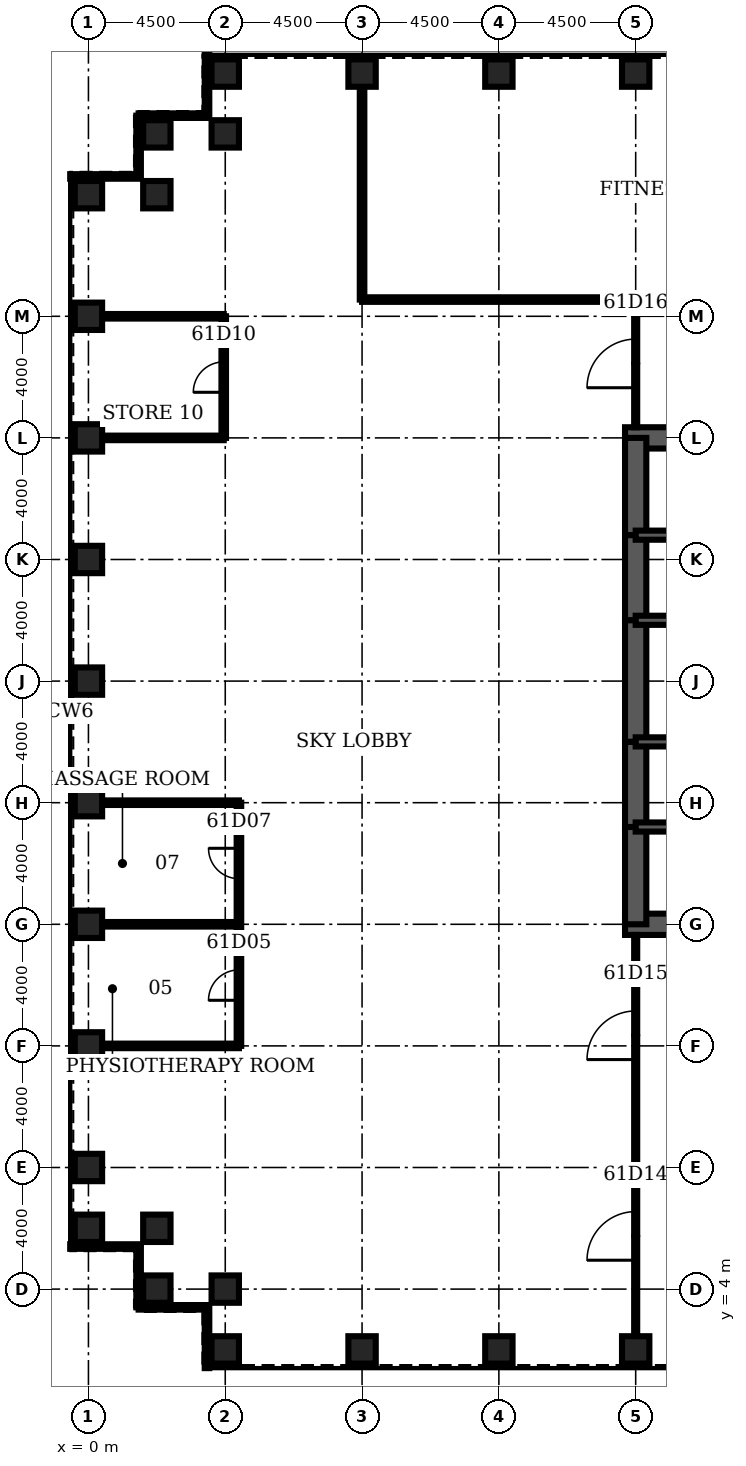
"""IFC4 building model, lengths in metres.
Left out: names, types, materials, properties, quantities, classifications, styles, units other than length and angle.
Written with IfcOpenShell. Run it as: python <this file> out.ifc"""

import sys

from ifc_helpers import new_model, si_unit, direction, frame, frame_2d, origin, origin_2d, place, context, subcontext, project, spatial, rectangle, hollow_rectangle, extrude, element, fill, save


model = new_model("IFC4")
c1 = context("Model", 3, precision=1e-05, world=origin(), true_north=direction((0.0, 1.0)))
c2 = subcontext(c1, "Body", "Model", "MODEL_VIEW")
j1 = project(units=[si_unit("LENGTHUNIT", "METRE"), si_unit("PLANEANGLEUNIT", "RADIAN")], contexts=[c1])
p1 = place(None, origin())
s1 = spatial("IfcSite", under=j1, at=p1, CompositionType="ELEMENT")
p2 = place(p1, origin())
s2 = spatial("IfcBuilding", under=s1, at=p2, CompositionType="ELEMENT")
p3 = place(p2, frame((0.0, 0.0, 271.1)))
s3 = spatial("IfcBuildingStorey", under=s2, at=p3, CompositionType="ELEMENT", Elevation=271.1)
for number, where, z_axis, x_axis in (
    (1, (4.5, 2.0, 0.0), (0.0, 0.0, 1.0), (0.0, 1.0, 0.0)),
    (2, (9.0, 2.0, 0.0), (0.0, 0.0, 1.0), (0.0, 1.0, 0.0)),
    (3, (13.5, 2.0, 0.0), (0.0, 0.0, 1.0), (0.0, 1.0, 0.0)),
    (4, (18.0, 2.0, 0.0), (0.0, 0.0, 1.0), (0.0, 1.0, 0.0)),
    (5, (18.0, 44.0, 0.0), (0.0, 0.0, 1.0), (0.0, 1.0, 0.0)),
    (6, (13.5, 44.0, 0.0), (0.0, 0.0, 1.0), (0.0, 1.0, 0.0)),
    (7, (9.0, 44.0, 0.0), (0.0, 0.0, 1.0), (0.0, 1.0, 0.0)),
    (8, (4.5, 44.0, 0.0), (0.0, 0.0, 1.0), (0.0, 1.0, 0.0)),
    (9, (4.5, 42.0, 0.0), (0.0, 0.0, 1.0), (0.0, 1.0, 0.0)),
    (10, (2.25, 42.0, 0.0), (0.0, 0.0, 1.0), (1.0, 0.0, 0.0)),
    (11, (2.25, 40.0, 0.0), (0.0, 0.0, 1.0), (1.0, 0.0, 0.0)),
    (12, (0.0, 40.0, 0.0), (0.0, 0.0, 1.0), (1.0, 0.0, 0.0)),
    (13, (0.0, 36.0, 0.0), (0.0, 0.0, 1.0), (1.0, 0.0, 0.0)),
    (14, (0.0, 32.0, 0.0), (0.0, 0.0, 1.0), (1.0, 0.0, 0.0)),
    (15, (0.0, 28.0, 0.0), (0.0, 0.0, 1.0), (1.0, 0.0, 0.0)),
    (16, (0.0, 24.0, 0.0), (0.0, 0.0, 1.0), (1.0, 0.0, 0.0)),
    (17, (0.0, 20.0, 0.0), (0.0, 0.0, 1.0), (1.0, 0.0, 0.0)),
    (18, (0.0, 16.0, 0.0), (0.0, 0.0, 1.0), (1.0, 0.0, 0.0)),
    (19, (0.0, 12.0, 0.0), (0.0, 0.0, 1.0), (1.0, 0.0, 0.0)),
    (20, (0.0, 8.0, 0.0), (0.0, 0.0, 1.0), (1.0, 0.0, 0.0)),
    (21, (0.0, 6.0, 0.0), (0.0, 0.0, 1.0), (1.0, 0.0, 0.0)),
    (22, (2.25, 6.0, 0.0), (0.0, 0.0, 1.0), (1.0, 0.0, 0.0)),
    (23, (2.25, 4.0, 0.0), (0.0, 0.0, 1.0), (1.0, 0.0, 0.0)),
    (24, (4.5, 4.0, 0.0), (0.0, 0.0, 1.0), (0.0, 1.0, 0.0)),
):
    element("IfcColumn", number, at=place(p3, frame(where, z_axis=z_axis, x_axis=x_axis)), inside=s3, PredefinedType="COLUMN", context=c2, shape_type="SweptSolid", body=[
        extrude(hollow_rectangle(XDim=0.9, YDim=0.9, WallThickness=0.07, at=origin_2d()), origin(), (0.0, 0.0, 1.0), 4.2),
    ])
for number, where, z_axis, x_axis in (
    (25, (17.65, 16.0, 0.0), (0.0, 0.0, 1.0), (1.0, 0.0, 0.0)),
    (26, (27.0, 32.0, 0.0), (0.0, 0.0, 1.0), (-1.0, 0.0, 0.0)),
):
    element("IfcWall", number, at=place(p3, frame(where, z_axis=z_axis, x_axis=x_axis)), inside=s3, PredefinedType="SHEAR", context=c2, shape_type="SweptSolid", body=[
        extrude(rectangle(XDim=9.35, YDim=0.7, at=frame_2d((4.675, 0.0))), origin(), (0.0, 0.0, 1.0), 4.2),
    ])
p4 = place(p3, frame((18.0, 32.0, 0.0), z_axis=(0.0, 0.0, 1.0), x_axis=(0.0, -1.0, 0.0)))
e27 = element("IfcWall", 27, at=p4, inside=s3, PredefinedType="SHEAR", context=c2, shape_type="SweptSolid", body=[
    extrude(rectangle(XDim=3.2, YDim=0.7, at=frame_2d((1.6, 0.0))), origin(), (0.0, 0.0, 1.0), 4.2),
])
p5 = place(p3, frame((18.0, 28.8, 0.0), z_axis=(0.0, 0.0, 1.0), x_axis=(0.0, -1.0, 0.0)))
e28 = element("IfcWall", 28, at=p5, inside=s3, PredefinedType="SHEAR", context=c2, shape_type="SweptSolid", body=[
    extrude(rectangle(XDim=2.8, YDim=0.7, at=frame_2d((1.4, 0.0))), origin(), (0.0, 0.0, 1.0), 4.2),
])
p6 = place(p5, frame((0.4, 0.0, 0.0)))
e29 = element("IfcOpeningElement", 29, at=p6, cuts=e28, PredefinedType="OPENING", context=c2, shape_type="SweptSolid", body=[
    extrude(rectangle(XDim=1.8, YDim=2.1, at=frame_2d((0.9, 1.05))), frame((0.0, 0.36, 0.0), z_axis=(0.0, -1.0, 0.0), x_axis=(1.0, 0.0, 0.0)), (0.0, 0.0, 1.0), 0.72),
])
p7 = place(p3, frame((18.0, 26.0, 0.0), z_axis=(0.0, 0.0, 1.0), x_axis=(0.0, -1.0, 0.0)))
e30 = element("IfcWall", 30, at=p7, inside=s3, PredefinedType="SHEAR", context=c2, shape_type="SweptSolid", body=[
    extrude(rectangle(XDim=4.0, YDim=0.7, at=frame_2d((2.0, 0.0))), origin(), (0.0, 0.0, 1.0), 4.2),
])
p8 = place(p3, frame((18.0, 22.0, 0.0), z_axis=(0.0, 0.0, 1.0), x_axis=(0.0, -1.0, 0.0)))
e31 = element("IfcWall", 31, at=p8, inside=s3, PredefinedType="SHEAR", context=c2, shape_type="SweptSolid", body=[
    extrude(rectangle(XDim=2.8, YDim=0.7, at=frame_2d((1.4, 0.0))), origin(), (0.0, 0.0, 1.0), 4.2),
])
p9 = place(p8, frame((0.6, 0.0, 0.0)))
e32 = element("IfcOpeningElement", 32, at=p9, cuts=e31, PredefinedType="OPENING", context=c2, shape_type="SweptSolid", body=[
    extrude(rectangle(XDim=1.8, YDim=2.1, at=frame_2d((0.9, 1.05))), frame((0.0, 0.36, 0.0), z_axis=(0.0, -1.0, 0.0), x_axis=(1.0, 0.0, 0.0)), (0.0, 0.0, 1.0), 0.72),
])
p10 = place(p3, frame((18.0, 19.2, 0.0), z_axis=(0.0, 0.0, 1.0), x_axis=(0.0, -1.0, 0.0)))
e33 = element("IfcWall", 33, at=p10, inside=s3, PredefinedType="SHEAR", context=c2, shape_type="SweptSolid", body=[
    extrude(rectangle(XDim=3.2, YDim=0.7, at=frame_2d((1.6, 0.0))), origin(), (0.0, 0.0, 1.0), 4.2),
])
p11 = place(p3, frame((18.0, 19.2, 0.0), z_axis=(0.0, 0.0, 1.0), x_axis=(1.0, 0.0, 0.0)))
e34 = element("IfcWall", 34, at=p11, inside=s3, PredefinedType="SOLIDWALL", context=c2, shape_type="SweptSolid", body=[
    extrude(rectangle(XDim=9.0, YDim=0.3, at=frame_2d((4.5, 0.0))), origin(), (0.0, 0.0, 1.0), 4.2),
])
p12 = place(p11, frame((0.65, 0.0, 0.0)))
e35 = element("IfcOpeningElement", 35, at=p12, cuts=e34, PredefinedType="OPENING", context=c2, shape_type="SweptSolid", body=[
    extrude(rectangle(XDim=1.0, YDim=2.1, at=frame_2d((0.5, 1.05))), frame((0.0, 0.16, 0.0), z_axis=(0.0, -1.0, 0.0), x_axis=(1.0, 0.0, 0.0)), (0.0, 0.0, 1.0), 0.32),
])
p13 = place(p3, frame((18.0, 28.8, 0.0), z_axis=(0.0, 0.0, 1.0), x_axis=(1.0, 0.0, 0.0)))
e36 = element("IfcWall", 36, at=p13, inside=s3, PredefinedType="SOLIDWALL", context=c2, shape_type="SweptSolid", body=[
    extrude(rectangle(XDim=9.0, YDim=0.3, at=frame_2d((4.5, 0.0))), origin(), (0.0, 0.0, 1.0), 4.2),
])
p14 = place(p13, frame((0.65, 0.0, 0.0)))
e37 = element("IfcOpeningElement", 37, at=p14, cuts=e36, PredefinedType="OPENING", context=c2, shape_type="SweptSolid", body=[
    extrude(rectangle(XDim=1.0, YDim=2.1, at=frame_2d((0.5, 1.05))), frame((0.0, 0.16, 0.0), z_axis=(0.0, -1.0, 0.0), x_axis=(1.0, 0.0, 0.0)), (0.0, 0.0, 1.0), 0.32),
])
p15 = place(p3, frame((18.0, 22.0, 0.0), z_axis=(0.0, 0.0, 1.0), x_axis=(1.0, 0.0, 0.0)))
e38 = element("IfcWall", 38, at=p15, inside=s3, PredefinedType="SOLIDWALL", context=c2, shape_type="SweptSolid", body=[
    extrude(rectangle(XDim=6.0, YDim=0.3, at=frame_2d((3.0, 0.0))), origin(), (0.0, 0.0, 1.0), 4.2),
])
p16 = place(p15, frame((2.0, 0.0, 0.0)))
e39 = element("IfcOpeningElement", 39, at=p16, cuts=e38, PredefinedType="OPENING", context=c2, shape_type="SweptSolid", body=[
    extrude(rectangle(XDim=1.0, YDim=2.1, at=frame_2d((0.5, 1.05))), frame((0.0, 0.16, 0.0), z_axis=(0.0, -1.0, 0.0), x_axis=(1.0, 0.0, 0.0)), (0.0, 0.0, 1.0), 0.32),
])
p17 = place(p3, frame((18.0, 26.0, 0.0), z_axis=(0.0, 0.0, 1.0), x_axis=(1.0, 0.0, 0.0)))
e40 = element("IfcWall", 40, at=p17, inside=s3, PredefinedType="SOLIDWALL", context=c2, shape_type="SweptSolid", body=[
    extrude(rectangle(XDim=6.0, YDim=0.3, at=frame_2d((3.0, 0.0))), origin(), (0.0, 0.0, 1.0), 4.2),
])
for number, where, z_axis, x_axis in (
    (41, (0.45, 12.0, 0.0), (0.0, 0.0, 1.0), (1.0, 0.0, 0.0)),
    (42, (0.45, 16.0, 0.0), (0.0, 0.0, 1.0), (1.0, 0.0, 0.0)),
    (43, (0.45, 20.0, 0.0), (0.0, 0.0, 1.0), (1.0, 0.0, 0.0)),
):
    element("IfcWall", number, at=place(p3, frame(where, z_axis=z_axis, x_axis=x_axis)), inside=s3, PredefinedType="PARTITIONING", context=c2, shape_type="SweptSolid", body=[
        extrude(rectangle(XDim=4.5, YDim=0.15, at=frame_2d((2.25, 0.0))), origin(), (0.0, 0.0, 1.0), 3.0),
    ])
for number, where, z_axis, x_axis in (
    (44, (0.45, 32.0, 0.0), (0.0, 0.0, 1.0), (1.0, 0.0, 0.0)),
    (45, (0.45, 36.0, 0.0), (0.0, 0.0, 1.0), (1.0, 0.0, 0.0)),
):
    element("IfcWall", number, at=place(p3, frame(where, z_axis=z_axis, x_axis=x_axis)), inside=s3, PredefinedType="PARTITIONING", context=c2, shape_type="SweptSolid", body=[
        extrude(rectangle(XDim=4.0, YDim=0.15, at=frame_2d((2.0, 0.0))), origin(), (0.0, 0.0, 1.0), 3.0),
    ])
p18 = place(p3, frame((9.0, 36.55, 0.0), z_axis=(0.0, 0.0, 1.0), x_axis=(1.0, 0.0, 0.0)))
e46 = element("IfcWall", 46, at=p18, inside=s3, PredefinedType="PARTITIONING", context=c2, shape_type="SweptSolid", body=[
    extrude(rectangle(XDim=22.5, YDim=0.15, at=frame_2d((11.25, 0.0))), origin(), (0.0, 0.0, 1.0), 3.0),
])
p19 = place(p18, frame((10.45, 0.0, 0.0)))
e47 = element("IfcOpeningElement", 47, at=p19, cuts=e46, PredefinedType="OPENING", context=c2, shape_type="SweptSolid", body=[
    extrude(rectangle(XDim=1.6, YDim=2.1, at=frame_2d((0.8, 1.05))), frame((0.0, 0.085, 0.0), z_axis=(0.0, -1.0, 0.0), x_axis=(1.0, 0.0, 0.0)), (0.0, 0.0, 1.0), 0.17),
])
p20 = place(p3, frame((4.45, 32.0, 0.0), z_axis=(0.0, 0.0, 1.0), x_axis=(0.0, 1.0, 0.0)))
e48 = element("IfcWall", 48, at=p20, inside=s3, PredefinedType="PARTITIONING", context=c2, shape_type="SweptSolid", body=[
    extrude(rectangle(XDim=4.0, YDim=0.15, at=frame_2d((2.0, 0.0))), origin(), (0.0, 0.0, 1.0), 3.0),
])
p21 = place(p20, frame((1.5, 0.0, 0.0)))
e49 = element("IfcOpeningElement", 49, at=p21, cuts=e48, PredefinedType="OPENING", context=c2, shape_type="SweptSolid", body=[
    extrude(rectangle(XDim=1.0, YDim=2.1, at=frame_2d((0.5, 1.05))), frame((0.0, 0.085, 0.0), z_axis=(0.0, -1.0, 0.0), x_axis=(1.0, 0.0, 0.0)), (0.0, 0.0, 1.0), 0.17),
])
p22 = place(p3, frame((4.95, 12.0, 0.0), z_axis=(0.0, 0.0, 1.0), x_axis=(0.0, 1.0, 0.0)))
e50 = element("IfcWall", 50, at=p22, inside=s3, PredefinedType="PARTITIONING", context=c2, shape_type="SweptSolid", body=[
    extrude(rectangle(XDim=8.0, YDim=0.15, at=frame_2d((4.0, 0.0))), origin(), (0.0, 0.0, 1.0), 3.0),
])
p23 = place(p22, frame((1.5, 0.0, 0.0)))
e51 = element("IfcOpeningElement", 51, at=p23, cuts=e50, PredefinedType="OPENING", context=c2, shape_type="SweptSolid", body=[
    extrude(rectangle(XDim=1.0, YDim=2.1, at=frame_2d((0.5, 1.05))), frame((0.0, 0.085, 0.0), z_axis=(0.0, -1.0, 0.0), x_axis=(1.0, 0.0, 0.0)), (0.0, 0.0, 1.0), 0.17),
])
p24 = place(p22, frame((5.5, 0.0, 0.0)))
e52 = element("IfcOpeningElement", 52, at=p24, cuts=e50, PredefinedType="OPENING", context=c2, shape_type="SweptSolid", body=[
    extrude(rectangle(XDim=1.0, YDim=2.1, at=frame_2d((0.5, 1.05))), frame((0.0, 0.085, 0.0), z_axis=(0.0, -1.0, 0.0), x_axis=(1.0, 0.0, 0.0)), (0.0, 0.0, 1.0), 0.17),
])
p25 = place(p3, frame((9.0, 36.55, 0.0), z_axis=(0.0, 0.0, 1.0), x_axis=(0.0, 1.0, 0.0)))
e53 = element("IfcWall", 53, at=p25, inside=s3, PredefinedType="PARTITIONING", context=c2, shape_type="SweptSolid", body=[
    extrude(rectangle(XDim=7.0, YDim=0.15, at=frame_2d((3.5, 0.0))), origin(), (0.0, 0.0, 1.0), 3.0),
])
p26 = place(p3, frame((18.0, 2.45, 0.0), z_axis=(0.0, 0.0, 1.0), x_axis=(0.0, 1.0, 0.0)))
e54 = element("IfcWall", 54, at=p26, inside=s3, PredefinedType="PARTITIONING", context=c2, shape_type="SweptSolid", body=[
    extrude(rectangle(XDim=13.2, YDim=0.1, at=frame_2d((6.6, 0.0))), origin(), (0.0, 0.0, 1.0), 3.0),
])
p27 = place(p26, frame((2.5, 0.0, 0.0)))
e55 = element("IfcOpeningElement", 55, at=p27, cuts=e54, PredefinedType="OPENING", context=c2, shape_type="SweptSolid", body=[
    extrude(rectangle(XDim=1.6, YDim=2.1, at=frame_2d((0.8, 1.05))), frame((0.0, 0.06, 0.0), z_axis=(0.0, -1.0, 0.0), x_axis=(1.0, 0.0, 0.0)), (0.0, 0.0, 1.0), 0.12),
])
p28 = place(p26, frame((9.1, 0.0, 0.0)))
e56 = element("IfcOpeningElement", 56, at=p28, cuts=e54, PredefinedType="OPENING", context=c2, shape_type="SweptSolid", body=[
    extrude(rectangle(XDim=1.6, YDim=2.1, at=frame_2d((0.8, 1.05))), frame((0.0, 0.06, 0.0), z_axis=(0.0, -1.0, 0.0), x_axis=(1.0, 0.0, 0.0)), (0.0, 0.0, 1.0), 0.12),
])
p29 = place(p3, frame((18.0, 32.35, 0.0), z_axis=(0.0, 0.0, 1.0), x_axis=(0.0, 1.0, 0.0)))
e57 = element("IfcWall", 57, at=p29, inside=s3, PredefinedType="PARTITIONING", context=c2, shape_type="SweptSolid", body=[
    extrude(rectangle(XDim=4.2, YDim=0.1, at=frame_2d((2.1, 0.0))), origin(), (0.0, 0.0, 1.0), 3.0),
])
p30 = place(p29, frame((1.3, 0.0, 0.0)))
e58 = element("IfcOpeningElement", 58, at=p30, cuts=e57, PredefinedType="OPENING", context=c2, shape_type="SweptSolid", body=[
    extrude(rectangle(XDim=1.6, YDim=2.1, at=frame_2d((0.8, 1.05))), frame((0.0, 0.06, 0.0), z_axis=(0.0, -1.0, 0.0), x_axis=(1.0, 0.0, 0.0)), (0.0, 0.0, 1.0), 0.12),
])
p31 = place(p3, frame((3.9, 44.6, 0.0), z_axis=(0.0, 0.0, 1.0), x_axis=(0.0, -1.0, 0.0)))
e59 = element("IfcWall", 59, at=p31, inside=s3, PredefinedType="ELEMENTEDWALL", context=c2, shape_type="SweptSolid", body=[
    extrude(rectangle(XDim=2.0, YDim=0.15, at=frame_2d((1.0, 0.0))), origin(), (0.0, 0.0, 1.0), 4.04),
])
p32 = place(p3, frame((3.9, 42.6, 0.0), z_axis=(0.0, 0.0, 1.0), x_axis=(-1.0, 0.0, 0.0)))
e60 = element("IfcWall", 60, at=p32, inside=s3, PredefinedType="ELEMENTEDWALL", context=c2, shape_type="SweptSolid", body=[
    extrude(rectangle(XDim=2.25, YDim=0.15, at=frame_2d((1.125, 0.0))), origin(), (0.0, 0.0, 1.0), 4.04),
])
p33 = place(p3, frame((1.65, 42.6, 0.0), z_axis=(0.0, 0.0, 1.0), x_axis=(0.0, -1.0, 0.0)))
e61 = element("IfcWall", 61, at=p33, inside=s3, PredefinedType="ELEMENTEDWALL", context=c2, shape_type="SweptSolid", body=[
    extrude(rectangle(XDim=2.0, YDim=0.15, at=frame_2d((1.0, 0.0))), origin(), (0.0, 0.0, 1.0), 4.04),
])
for number, where, z_axis, x_axis in (
    (62, (1.65, 40.6, 0.0), (0.0, 0.0, 1.0), (-1.0, 0.0, 0.0)),
    (63, (-0.6, 5.4, 0.0), (0.0, 0.0, 1.0), (1.0, 0.0, 0.0)),
):
    element("IfcWall", number, at=place(p3, frame(where, z_axis=z_axis, x_axis=x_axis)), inside=s3, PredefinedType="ELEMENTEDWALL", context=c2, shape_type="SweptSolid", body=[
        extrude(rectangle(XDim=2.25, YDim=0.15, at=frame_2d((1.125, 0.0))), origin(), (0.0, 0.0, 1.0), 4.04),
    ])
p34 = place(p3, frame((1.65, 5.4, 0.0), z_axis=(0.0, 0.0, 1.0), x_axis=(0.0, -1.0, 0.0)))
e64 = element("IfcWall", 64, at=p34, inside=s3, PredefinedType="ELEMENTEDWALL", context=c2, shape_type="SweptSolid", body=[
    extrude(rectangle(XDim=2.0, YDim=0.15, at=frame_2d((1.0, 0.0))), origin(), (0.0, 0.0, 1.0), 4.04),
])
p35 = place(p3, frame((1.65, 3.4, 0.0), z_axis=(0.0, 0.0, 1.0), x_axis=(1.0, 0.0, 0.0)))
e65 = element("IfcWall", 65, at=p35, inside=s3, PredefinedType="ELEMENTEDWALL", context=c2, shape_type="SweptSolid", body=[
    extrude(rectangle(XDim=2.25, YDim=0.15, at=frame_2d((1.125, 0.0))), origin(), (0.0, 0.0, 1.0), 4.04),
])
p36 = place(p3, frame((3.9, 3.4, 0.0), z_axis=(0.0, 0.0, 1.0), x_axis=(0.0, -1.0, 0.0)))
e66 = element("IfcWall", 66, at=p36, inside=s3, PredefinedType="ELEMENTEDWALL", context=c2, shape_type="SweptSolid", body=[
    extrude(rectangle(XDim=2.0, YDim=0.15, at=frame_2d((1.0, 0.0))), origin(), (0.0, 0.0, 1.0), 4.04),
])
p37 = place(p23, origin())
e67 = element("IfcDoor", 67, at=p37, inside=s3, OperationType="SINGLE_SWING_LEFT", PredefinedType="DOOR", context=c2, shape_type="SweptSolid", body=[
    extrude(rectangle(XDim=1.0, YDim=2.1, at=frame_2d((0.5, 1.05))), frame((0.0, 0.025, 0.0), z_axis=(0.0, -1.0, 0.0), x_axis=(1.0, 0.0, 0.0)), (0.0, 0.0, 1.0), 0.05),
])
fill(e51, e67)
p38 = place(p24, origin())
e68 = element("IfcDoor", 68, at=p38, inside=s3, OperationType="SINGLE_SWING_RIGHT", PredefinedType="DOOR", context=c2, shape_type="SweptSolid", body=[
    extrude(rectangle(XDim=1.0, YDim=2.1, at=frame_2d((0.5, 1.05))), frame((0.0, 0.025, 0.0), z_axis=(0.0, -1.0, 0.0), x_axis=(1.0, 0.0, 0.0)), (0.0, 0.0, 1.0), 0.05),
])
fill(e52, e68)
p39 = place(p21, origin())
e69 = element("IfcDoor", 69, at=p39, inside=s3, OperationType="SINGLE_SWING_LEFT", PredefinedType="DOOR", context=c2, shape_type="SweptSolid", body=[
    extrude(rectangle(XDim=1.0, YDim=2.1, at=frame_2d((0.5, 1.05))), frame((0.0, 0.025, 0.0), z_axis=(0.0, -1.0, 0.0), x_axis=(1.0, 0.0, 0.0)), (0.0, 0.0, 1.0), 0.05),
])
fill(e49, e69)
p40 = place(p27, origin())
e70 = element("IfcDoor", 70, at=p40, inside=s3, OperationType="SINGLE_SWING_LEFT", PredefinedType="DOOR", context=c2, shape_type="SweptSolid", body=[
    extrude(rectangle(XDim=1.6, YDim=2.1, at=frame_2d((0.8, 1.05))), frame((0.0, 0.025, 0.0), z_axis=(0.0, -1.0, 0.0), x_axis=(1.0, 0.0, 0.0)), (0.0, 0.0, 1.0), 0.05),
])
fill(e55, e70)
p41 = place(p28, origin())
e71 = element("IfcDoor", 71, at=p41, inside=s3, OperationType="SINGLE_SWING_LEFT", PredefinedType="DOOR", context=c2, shape_type="SweptSolid", body=[
    extrude(rectangle(XDim=1.6, YDim=2.1, at=frame_2d((0.8, 1.05))), frame((0.0, 0.025, 0.0), z_axis=(0.0, -1.0, 0.0), x_axis=(1.0, 0.0, 0.0)), (0.0, 0.0, 1.0), 0.05),
])
fill(e56, e71)
p42 = place(p30, origin())
e72 = element("IfcDoor", 72, at=p42, inside=s3, OperationType="SINGLE_SWING_LEFT", PredefinedType="DOOR", context=c2, shape_type="SweptSolid", body=[
    extrude(rectangle(XDim=1.6, YDim=2.1, at=frame_2d((0.8, 1.05))), frame((0.0, 0.025, 0.0), z_axis=(0.0, -1.0, 0.0), x_axis=(1.0, 0.0, 0.0)), (0.0, 0.0, 1.0), 0.05),
])
fill(e58, e72)
p43 = place(p12, origin())
e73 = element("IfcDoor", 73, at=p43, inside=s3, OperationType="SINGLE_SWING_LEFT", PredefinedType="DOOR", context=c2, shape_type="SweptSolid", body=[
    extrude(rectangle(XDim=1.0, YDim=2.1, at=frame_2d((0.5, 1.05))), frame((0.0, 0.025, 0.0), z_axis=(0.0, -1.0, 0.0), x_axis=(1.0, 0.0, 0.0)), (0.0, 0.0, 1.0), 0.05),
])
fill(e35, e73)
p44 = place(p14, origin())
e74 = element("IfcDoor", 74, at=p44, inside=s3, OperationType="SINGLE_SWING_LEFT", PredefinedType="DOOR", context=c2, shape_type="SweptSolid", body=[
    extrude(rectangle(XDim=1.0, YDim=2.1, at=frame_2d((0.5, 1.05))), frame((0.0, 0.025, 0.0), z_axis=(0.0, -1.0, 0.0), x_axis=(1.0, 0.0, 0.0)), (0.0, 0.0, 1.0), 0.05),
])
fill(e37, e74)
p45 = place(p9, origin())
e75 = element("IfcDoor", 75, at=p45, inside=s3, OperationType="SINGLE_SWING_LEFT", PredefinedType="DOOR", context=c2, shape_type="SweptSolid", body=[
    extrude(rectangle(XDim=1.8, YDim=2.1, at=frame_2d((0.9, 1.05))), frame((0.0, 0.35, 0.0), z_axis=(0.0, -1.0, 0.0), x_axis=(1.0, 0.0, 0.0)), (0.0, 0.0, 1.0), 0.699),
])
fill(e32, e75)
p46 = place(p6, origin())
e76 = element("IfcDoor", 76, at=p46, inside=s3, OperationType="SINGLE_SWING_LEFT", PredefinedType="DOOR", context=c2, shape_type="SweptSolid", body=[
    extrude(rectangle(XDim=1.8, YDim=2.1, at=frame_2d((0.9, 1.05))), frame((0.0, 0.35, 0.0), z_axis=(0.0, -1.0, 0.0), x_axis=(1.0, 0.0, 0.0)), (0.0, 0.0, 1.0), 0.699),
])
fill(e29, e76)
save(model, sys.argv[1])
